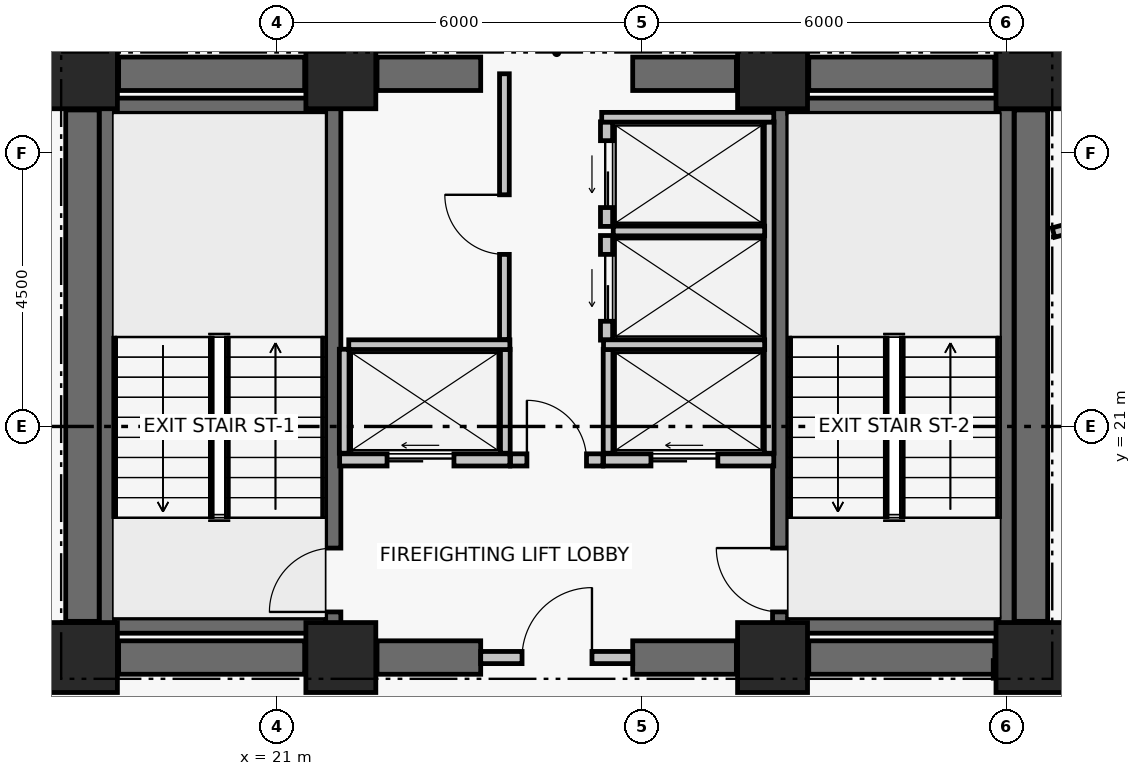
"""IFC4 building model, lengths in metres.
Left out: names, types, materials, properties, quantities, classifications, styles, units other than length and angle.
Written with IfcOpenShell. Run it as: python <this file> out.ifc"""

import sys

from ifc_helpers import new_model, si_unit, direction, frame, frame_2d, origin, origin_2d, place, context, subcontext, project, spatial, rectangle, extrude, element, fill, save


model = new_model("IFC4")
c1 = context("Model", 3, precision=1e-05, world=origin(), true_north=direction((0.0, 1.0)))
c2 = subcontext(c1, "Body", "Model", "MODEL_VIEW")
j1 = project(units=[si_unit("LENGTHUNIT", "METRE"), si_unit("PLANEANGLEUNIT", "RADIAN")], contexts=[c1])
p1 = place(None, origin())
s1 = spatial("IfcSite", under=j1, at=p1, CompositionType="ELEMENT")
p2 = place(p1, origin())
s2 = spatial("IfcBuilding", under=s1, at=p2, CompositionType="ELEMENT")
p3 = place(p2, frame((0.0, 0.0, 148.62)))
s3 = spatial("IfcBuildingStorey", under=s2, at=p3, CompositionType="ELEMENT", Elevation=148.62)
for number, where, z_axis, x_axis in (
    (1, (17.8, 17.2, 0.0), (0.0, 0.0, 1.0), (1.0, 0.0, 0.0)),
    (2, (22.05, 17.2, 0.0), (0.0, 0.0, 1.0), (1.0, 0.0, 0.0)),
    (3, (29.15, 17.2, 0.0), (0.0, 0.0, 1.0), (1.0, 0.0, 0.0)),
    (4, (33.4, 17.2, 0.0), (0.0, 0.0, 1.0), (1.0, 0.0, 0.0)),
    (5, (17.8, 26.8, 0.0), (0.0, 0.0, 1.0), (1.0, 0.0, 0.0)),
    (6, (22.05, 26.8, 0.0), (0.0, 0.0, 1.0), (1.0, 0.0, 0.0)),
    (7, (29.15, 26.8, 0.0), (0.0, 0.0, 1.0), (1.0, 0.0, 0.0)),
    (8, (33.4, 26.8, 0.0), (0.0, 0.0, 1.0), (1.0, 0.0, 0.0)),
):
    element("IfcColumn", number, at=place(p3, frame(where, z_axis=z_axis, x_axis=x_axis)), inside=s3, PredefinedType="COLUMN", context=c2, shape_type="SweptSolid", body=[
        extrude(rectangle(XDim=1.15, YDim=1.15, at=origin_2d()), origin(), (0.0, 0.0, 1.0), 5.7),
    ])
p4 = place(p3, frame((18.395, 17.2, 0.0), z_axis=(0.0, 0.0, 1.0), x_axis=(1.0, 0.0, 0.0)))
e9 = element("IfcWall", 9, at=p4, inside=s3, PredefinedType="SHEAR", context=c2, shape_type="SweptSolid", body=[
    extrude(rectangle(XDim=3.06, YDim=0.55, at=frame_2d((1.53, 0.0))), origin(), (0.0, 0.0, 1.0), 5.42),
])
p5 = place(p3, frame((22.645, 17.2, 0.0), z_axis=(0.0, 0.0, 1.0), x_axis=(1.0, 0.0, 0.0)))
e10 = element("IfcWall", 10, at=p5, inside=s3, PredefinedType="SHEAR", context=c2, shape_type="SweptSolid", body=[
    extrude(rectangle(XDim=1.705, YDim=0.55, at=frame_2d((0.853, 0.0))), origin(), (0.0, 0.0, 1.0), 5.42),
])
p6 = place(p3, frame((26.85, 17.2, 0.0), z_axis=(0.0, 0.0, 1.0), x_axis=(1.0, 0.0, 0.0)))
e11 = element("IfcWall", 11, at=p6, inside=s3, PredefinedType="SHEAR", context=c2, shape_type="SweptSolid", body=[
    extrude(rectangle(XDim=1.705, YDim=0.55, at=frame_2d((0.853, 0.0))), origin(), (0.0, 0.0, 1.0), 5.42),
])
p7 = place(p3, frame((29.745, 17.2, 0.0), z_axis=(0.0, 0.0, 1.0), x_axis=(1.0, 0.0, 0.0)))
e12 = element("IfcWall", 12, at=p7, inside=s3, PredefinedType="SHEAR", context=c2, shape_type="SweptSolid", body=[
    extrude(rectangle(XDim=3.06, YDim=0.55, at=frame_2d((1.53, 0.0))), origin(), (0.0, 0.0, 1.0), 5.42),
])
p8 = place(p3, frame((18.395, 26.8, 0.0), z_axis=(0.0, 0.0, 1.0), x_axis=(1.0, 0.0, 0.0)))
e13 = element("IfcWall", 13, at=p8, inside=s3, PredefinedType="SHEAR", context=c2, shape_type="SweptSolid", body=[
    extrude(rectangle(XDim=3.06, YDim=0.55, at=frame_2d((1.53, 0.0))), origin(), (0.0, 0.0, 1.0), 5.42),
])
p9 = place(p3, frame((22.645, 26.8, 0.0), z_axis=(0.0, 0.0, 1.0), x_axis=(1.0, 0.0, 0.0)))
e14 = element("IfcWall", 14, at=p9, inside=s3, PredefinedType="SHEAR", context=c2, shape_type="SweptSolid", body=[
    extrude(rectangle(XDim=1.705, YDim=0.55, at=frame_2d((0.853, 0.0))), origin(), (0.0, 0.0, 1.0), 5.42),
])
p10 = place(p3, frame((26.85, 26.8, 0.0), z_axis=(0.0, 0.0, 1.0), x_axis=(1.0, 0.0, 0.0)))
e15 = element("IfcWall", 15, at=p10, inside=s3, PredefinedType="SHEAR", context=c2, shape_type="SweptSolid", body=[
    extrude(rectangle(XDim=1.705, YDim=0.55, at=frame_2d((0.853, 0.0))), origin(), (0.0, 0.0, 1.0), 5.42),
])
p11 = place(p3, frame((29.745, 26.8, 0.0), z_axis=(0.0, 0.0, 1.0), x_axis=(1.0, 0.0, 0.0)))
e16 = element("IfcWall", 16, at=p11, inside=s3, PredefinedType="SHEAR", context=c2, shape_type="SweptSolid", body=[
    extrude(rectangle(XDim=3.06, YDim=0.55, at=frame_2d((1.53, 0.0))), origin(), (0.0, 0.0, 1.0), 5.42),
])
for number, where, z_axis, x_axis in (
    (17, (17.8, 17.795, 0.0), (0.0, 0.0, 1.0), (0.0, 1.0, 0.0)),
    (18, (33.4, 17.795, 0.0), (0.0, 0.0, 1.0), (0.0, 1.0, 0.0)),
):
    element("IfcWall", number, at=place(p3, frame(where, z_axis=z_axis, x_axis=x_axis)), inside=s3, PredefinedType="SHEAR", context=c2, shape_type="SweptSolid", body=[
        extrude(rectangle(XDim=8.41, YDim=0.55, at=frame_2d((4.205, 0.0))), origin(), (0.0, 0.0, 1.0), 5.42),
    ])
p12 = place(p3, frame((18.204, 17.6, 0.0), z_axis=(0.0, 0.0, 1.0), x_axis=(0.0, 1.0, 0.0)))
e19 = element("IfcWall", 19, at=p12, inside=s3, PredefinedType="SHEAR", context=c2, shape_type="SweptSolid", body=[
    extrude(rectangle(XDim=8.8, YDim=0.25, at=frame_2d((4.4, 0.0))), origin(), (0.0, 0.0, 1.0), 5.42),
])
p13 = place(p3, frame((21.925, 17.6, 0.0), z_axis=(0.0, 0.0, 1.0), x_axis=(0.0, 1.0, 0.0)))
e20 = element("IfcWall", 20, at=p13, inside=s3, PredefinedType="SHEAR", context=c2, shape_type="SweptSolid", body=[
    extrude(rectangle(XDim=8.8, YDim=0.25, at=frame_2d((4.4, 0.0))), origin(), (0.0, 0.0, 1.0), 5.42),
])
p14 = place(p13, frame((0.35, 0.0, 0.0)))
e21 = element("IfcOpeningElement", 21, at=p14, cuts=e20, PredefinedType="OPENING", context=c2, shape_type="SweptSolid", body=[
    extrude(rectangle(XDim=1.05, YDim=2.08, at=frame_2d((0.525, 1.04))), frame((0.0, 0.135, 0.0), z_axis=(0.0, -1.0, 0.0), x_axis=(1.0, 0.0, 0.0)), (0.0, 0.0, 1.0), 0.27),
])
for number, where, z_axis, x_axis in (
    (22, (18.329, 17.725, 0.0), (0.0, 0.0, 1.0), (1.0, 0.0, 0.0)),
    (23, (18.329, 26.275, 0.0), (0.0, 0.0, 1.0), (1.0, 0.0, 0.0)),
):
    element("IfcWall", number, at=place(p3, frame(where, z_axis=z_axis, x_axis=x_axis)), inside=s3, PredefinedType="SHEAR", context=c2, shape_type="SweptSolid", body=[
        extrude(rectangle(XDim=3.471, YDim=0.25, at=frame_2d((1.735, 0.0))), origin(), (0.0, 0.0, 1.0), 5.42),
    ])
p15 = place(p3, frame((29.275, 17.6, 0.0), z_axis=(0.0, 0.0, 1.0), x_axis=(0.0, 1.0, 0.0)))
e24 = element("IfcWall", 24, at=p15, inside=s3, PredefinedType="SHEAR", context=c2, shape_type="SweptSolid", body=[
    extrude(rectangle(XDim=8.8, YDim=0.25, at=frame_2d((4.4, 0.0))), origin(), (0.0, 0.0, 1.0), 5.42),
])
p16 = place(p15, frame((0.35, 0.0, 0.0)))
e25 = element("IfcOpeningElement", 25, at=p16, cuts=e24, PredefinedType="OPENING", context=c2, shape_type="SweptSolid", body=[
    extrude(rectangle(XDim=1.05, YDim=2.08, at=frame_2d((0.525, 1.04))), frame((0.0, 0.135, 0.0), z_axis=(0.0, -1.0, 0.0), x_axis=(1.0, 0.0, 0.0)), (0.0, 0.0, 1.0), 0.27),
])
p17 = place(p3, frame((32.996, 17.6, 0.0), z_axis=(0.0, 0.0, 1.0), x_axis=(0.0, 1.0, 0.0)))
e26 = element("IfcWall", 26, at=p17, inside=s3, PredefinedType="SHEAR", context=c2, shape_type="SweptSolid", body=[
    extrude(rectangle(XDim=8.8, YDim=0.25, at=frame_2d((4.4, 0.0))), origin(), (0.0, 0.0, 1.0), 5.42),
])
for number, where, z_axis, x_axis in (
    (27, (29.4, 17.725, 0.0), (0.0, 0.0, 1.0), (1.0, 0.0, 0.0)),
    (28, (29.4, 26.275, 0.0), (0.0, 0.0, 1.0), (1.0, 0.0, 0.0)),
):
    element("IfcWall", number, at=place(p3, frame(where, z_axis=z_axis, x_axis=x_axis)), inside=s3, PredefinedType="SHEAR", context=c2, shape_type="SweptSolid", body=[
        extrude(rectangle(XDim=3.471, YDim=0.25, at=frame_2d((1.736, 0.0))), origin(), (0.0, 0.0, 1.0), 5.42),
    ])
p18 = place(p3, frame((24.35, 17.2, 0.0), z_axis=(0.0, 0.0, 1.0), x_axis=(1.0, 0.0, 0.0)))
e29 = element("IfcWall", 29, at=p18, inside=s3, PredefinedType="PARTITIONING", context=c2, shape_type="SweptSolid", body=[
    extrude(rectangle(XDim=2.5, YDim=0.2, at=frame_2d((1.25, 0.0))), origin(), (0.0, 0.0, 1.0), 4.55),
])
p19 = place(p18, frame((0.68, 0.0, 0.0)))
e30 = element("IfcOpeningElement", 30, at=p19, cuts=e29, PredefinedType="OPENING", context=c2, shape_type="SweptSolid", body=[
    extrude(rectangle(XDim=1.15, YDim=2.08, at=frame_2d((0.575, 1.04))), frame((0.0, 0.11, 0.0), z_axis=(0.0, -1.0, 0.0), x_axis=(1.0, 0.0, 0.0)), (0.0, 0.0, 1.0), 0.22),
])
p20 = place(p3, frame((24.84, 20.45, 0.0), z_axis=(0.0, 0.0, 1.0), x_axis=(1.0, 0.0, 0.0)))
e31 = element("IfcWall", 31, at=p20, inside=s3, PredefinedType="PARTITIONING", context=c2, shape_type="SweptSolid", body=[
    extrude(rectangle(XDim=1.52, YDim=0.2, at=frame_2d((0.76, 0.0))), origin(), (0.0, 0.0, 1.0), 5.42),
])
p21 = place(p20, frame((0.27, 0.0, 0.0)))
e32 = element("IfcOpeningElement", 32, at=p21, cuts=e31, PredefinedType="OPENING", context=c2, shape_type="SweptSolid", body=[
    extrude(rectangle(XDim=0.98, YDim=2.06, at=frame_2d((0.49, 1.03))), frame((0.0, 0.11, 0.0), z_axis=(0.0, -1.0, 0.0), x_axis=(1.0, 0.0, 0.0)), (0.0, 0.0, 1.0), 0.22),
])
p22 = place(p3, frame((22.03, 20.45, 0.0), z_axis=(0.0, 0.0, 1.0), x_axis=(1.0, 0.0, 0.0)))
e33 = element("IfcWall", 33, at=p22, inside=s3, PredefinedType="PARTITIONING", context=c2, shape_type="SweptSolid", body=[
    extrude(rectangle(XDim=2.8, YDim=0.2, at=frame_2d((1.4, 0.0))), origin(), (0.0, 0.0, 1.0), 5.42),
])
p23 = place(p22, frame((0.78, 0.0, 0.0)))
e34 = element("IfcOpeningElement", 34, at=p23, cuts=e33, PredefinedType="OPENING", context=c2, shape_type="SweptSolid", body=[
    extrude(rectangle(XDim=1.1, YDim=2.08, at=frame_2d((0.55, 1.04))), frame((0.0, 0.11, 0.0), z_axis=(0.0, -1.0, 0.0), x_axis=(1.0, 0.0, 0.0)), (0.0, 0.0, 1.0), 0.22),
])
p24 = place(p3, frame((26.37, 20.45, 0.0), z_axis=(0.0, 0.0, 1.0), x_axis=(1.0, 0.0, 0.0)))
e35 = element("IfcWall", 35, at=p24, inside=s3, PredefinedType="PARTITIONING", context=c2, shape_type="SweptSolid", body=[
    extrude(rectangle(XDim=2.8, YDim=0.2, at=frame_2d((1.4, 0.0))), origin(), (0.0, 0.0, 1.0), 5.42),
])
p25 = place(p24, frame((0.78, 0.0, 0.0)))
e36 = element("IfcOpeningElement", 36, at=p25, cuts=e35, PredefinedType="OPENING", context=c2, shape_type="SweptSolid", body=[
    extrude(rectangle(XDim=1.1, YDim=2.08, at=frame_2d((0.55, 1.04))), frame((0.0, 0.11, 0.0), z_axis=(0.0, -1.0, 0.0), x_axis=(1.0, 0.0, 0.0)), (0.0, 0.0, 1.0), 0.22),
])
p26 = place(p3, frame((26.42, 22.42, 0.0), z_axis=(0.0, 0.0, 1.0), x_axis=(0.0, 1.0, 0.0)))
e37 = element("IfcWall", 37, at=p26, inside=s3, PredefinedType="PARTITIONING", context=c2, shape_type="SweptSolid", body=[
    extrude(rectangle(XDim=1.72, YDim=0.2, at=frame_2d((0.86, 0.0))), origin(), (0.0, 0.0, 1.0), 5.42),
])
p27 = place(p26, frame((0.31, 0.0, 0.0)))
e38 = element("IfcOpeningElement", 38, at=p27, cuts=e37, PredefinedType="OPENING", context=c2, shape_type="SweptSolid", body=[
    extrude(rectangle(XDim=1.1, YDim=2.08, at=frame_2d((0.55, 1.04))), frame((0.0, 0.11, 0.0), z_axis=(0.0, -1.0, 0.0), x_axis=(1.0, 0.0, 0.0)), (0.0, 0.0, 1.0), 0.22),
])
p28 = place(p3, frame((26.42, 24.29, 0.0), z_axis=(0.0, 0.0, 1.0), x_axis=(0.0, 1.0, 0.0)))
e39 = element("IfcWall", 39, at=p28, inside=s3, PredefinedType="PARTITIONING", context=c2, shape_type="SweptSolid", body=[
    extrude(rectangle(XDim=1.72, YDim=0.2, at=frame_2d((0.86, 0.0))), origin(), (0.0, 0.0, 1.0), 5.42),
])
p29 = place(p28, frame((0.31, 0.0, 0.0)))
e40 = element("IfcOpeningElement", 40, at=p29, cuts=e39, PredefinedType="OPENING", context=c2, shape_type="SweptSolid", body=[
    extrude(rectangle(XDim=1.1, YDim=2.08, at=frame_2d((0.55, 1.04))), frame((0.0, 0.11, 0.0), z_axis=(0.0, -1.0, 0.0), x_axis=(1.0, 0.0, 0.0)), (0.0, 0.0, 1.0), 0.22),
])
for number, where, z_axis, x_axis in (
    (41, (22.105, 20.56, 0.0), (0.0, 0.0, 1.0), (0.0, 1.0, 0.0)),
    (42, (24.755, 20.56, 0.0), (0.0, 0.0, 1.0), (0.0, 1.0, 0.0)),
):
    element("IfcWall", number, at=place(p3, frame(where, z_axis=z_axis, x_axis=x_axis)), inside=s3, PredefinedType="PARTITIONING", context=c2, shape_type="SweptSolid", body=[
        extrude(rectangle(XDim=1.71, YDim=0.16, at=frame_2d((0.855, 0.0))), origin(), (0.0, 0.0, 1.0), 5.42),
    ])
p30 = place(p3, frame((22.18, 22.345, 0.0), z_axis=(0.0, 0.0, 1.0), x_axis=(1.0, 0.0, 0.0)))
e43 = element("IfcWall", 43, at=p30, inside=s3, PredefinedType="PARTITIONING", context=c2, shape_type="SweptSolid", body=[
    extrude(rectangle(XDim=2.65, YDim=0.16, at=frame_2d((1.325, 0.0))), origin(), (0.0, 0.0, 1.0), 5.42),
])
p31 = place(p3, frame((29.095, 20.56, 0.0), z_axis=(0.0, 0.0, 1.0), x_axis=(0.0, 1.0, 0.0)))
e44 = element("IfcWall", 44, at=p31, inside=s3, PredefinedType="PARTITIONING", context=c2, shape_type="SweptSolid", body=[
    extrude(rectangle(XDim=5.45, YDim=0.16, at=frame_2d((2.725, 0.0))), origin(), (0.0, 0.0, 1.0), 5.42),
])
p32 = place(p3, frame((26.445, 20.56, 0.0), z_axis=(0.0, 0.0, 1.0), x_axis=(0.0, 1.0, 0.0)))
e45 = element("IfcWall", 45, at=p32, inside=s3, PredefinedType="PARTITIONING", context=c2, shape_type="SweptSolid", body=[
    extrude(rectangle(XDim=1.71, YDim=0.16, at=frame_2d((0.855, 0.0))), origin(), (0.0, 0.0, 1.0), 5.42),
])
p33 = place(p3, frame((26.37, 22.345, 0.0), z_axis=(0.0, 0.0, 1.0), x_axis=(1.0, 0.0, 0.0)))
e46 = element("IfcWall", 46, at=p33, inside=s3, PredefinedType="PARTITIONING", context=c2, shape_type="SweptSolid", body=[
    extrude(rectangle(XDim=2.65, YDim=0.16, at=frame_2d((1.325, 0.0))), origin(), (0.0, 0.0, 1.0), 5.42),
])
p34 = place(p3, frame((26.53, 24.215, 0.0), z_axis=(0.0, 0.0, 1.0), x_axis=(1.0, 0.0, 0.0)))
e47 = element("IfcWall", 47, at=p34, inside=s3, PredefinedType="PARTITIONING", context=c2, shape_type="SweptSolid", body=[
    extrude(rectangle(XDim=2.49, YDim=0.16, at=frame_2d((1.245, 0.0))), origin(), (0.0, 0.0, 1.0), 5.42),
])
p35 = place(p3, frame((26.34, 26.085, 0.0), z_axis=(0.0, 0.0, 1.0), x_axis=(1.0, 0.0, 0.0)))
e48 = element("IfcWall", 48, at=p35, inside=s3, PredefinedType="PARTITIONING", context=c2, shape_type="SweptSolid", body=[
    extrude(rectangle(XDim=2.83, YDim=0.16, at=frame_2d((1.415, 0.0))), origin(), (0.0, 0.0, 1.0), 5.42),
])
p36 = place(p3, frame((24.74, 22.43, 0.0), z_axis=(0.0, 0.0, 1.0), x_axis=(0.0, 1.0, 0.0)))
e49 = element("IfcWall", 49, at=p36, inside=s3, PredefinedType="PARTITIONING", context=c2, shape_type="SweptSolid", body=[
    extrude(rectangle(XDim=4.37, YDim=0.16, at=frame_2d((2.185, 0.0))), origin(), (0.0, 0.0, 1.0), 4.55),
])
p37 = place(p36, frame((1.4, 0.0, 0.0)))
e50 = element("IfcOpeningElement", 50, at=p37, cuts=e49, PredefinedType="OPENING", context=c2, shape_type="SweptSolid", body=[
    extrude(rectangle(XDim=0.98, YDim=2.06, at=frame_2d((0.49, 1.03))), frame((0.0, 0.09, 0.0), z_axis=(0.0, -1.0, 0.0), x_axis=(1.0, 0.0, 0.0)), (0.0, 0.0, 1.0), 0.18),
])
for number, where, z_axis, x_axis in (
    (51, (32.88, 16.78, 0.0), (0.0, 0.0, 1.0), (1.0, 0.0, 0.0)),
    (52, (33.74, 27.22, 0.0), (0.0, 0.0, 1.0), (-1.0, 0.0, 0.0)),
):
    element("IfcWall", number, at=place(p3, frame(where, z_axis=z_axis, x_axis=x_axis)), inside=s3, PredefinedType="PARTITIONING", context=c2, shape_type="SweptSolid", body=[
        extrude(rectangle(XDim=0.86, YDim=0.2, at=frame_2d((0.43, 0.0))), origin(), (0.0, 0.0, 1.0), 4.55),
    ])
p38 = place(p3, frame((33.77, 24.189, 0.0), z_axis=(0.0, 0.0, 1.0), x_axis=(0.96592502591, 0.258822032141, 0.0)))
e53 = element("IfcWall", 53, at=p38, inside=s3, PredefinedType="PARTITIONING", context=c2, shape_type="SweptSolid", body=[
    extrude(rectangle(XDim=4.875, YDim=0.16, at=frame_2d((2.438, 0.0))), origin(), (0.0, 0.0, 1.0), 4.55),
])
p39 = place(p3, frame((32.88, 16.86, 0.0), z_axis=(0.0, 0.0, 1.0), x_axis=(0.0, 1.0, 0.0)))
e54 = element("IfcWall", 54, at=p39, inside=s3, PredefinedType="PARTITIONING", context=c2, shape_type="SweptSolid", body=[
    extrude(rectangle(XDim=0.29, YDim=0.2, at=frame_2d((0.145, 0.0))), origin(), (0.0, 0.0, 1.0), 4.55),
])
p40 = place(p14, origin())
e55 = element("IfcDoor", 55, at=p40, inside=s3, OperationType="SINGLE_SWING_LEFT", PredefinedType="DOOR", context=c2, shape_type="SweptSolid", body=[
    extrude(rectangle(XDim=1.05, YDim=2.08, at=frame_2d((0.525, 1.04))), frame((0.0, 0.025, 0.0), z_axis=(0.0, -1.0, 0.0), x_axis=(1.0, 0.0, 0.0)), (0.0, 0.0, 1.0), 0.05),
])
fill(e21, e55)
p41 = place(p16, origin())
e56 = element("IfcDoor", 56, at=p41, inside=s3, OperationType="SINGLE_SWING_RIGHT", PredefinedType="DOOR", context=c2, shape_type="SweptSolid", body=[
    extrude(rectangle(XDim=1.05, YDim=2.08, at=frame_2d((0.525, 1.04))), frame((0.0, 0.025, 0.0), z_axis=(0.0, -1.0, 0.0), x_axis=(1.0, 0.0, 0.0)), (0.0, 0.0, 1.0), 0.05),
])
fill(e25, e56)
p42 = place(p19, origin())
e57 = element("IfcDoor", 57, at=p42, inside=s3, OperationType="SINGLE_SWING_RIGHT", PredefinedType="DOOR", context=c2, shape_type="SweptSolid", body=[
    extrude(rectangle(XDim=1.15, YDim=2.08, at=frame_2d((0.575, 1.04))), frame((0.0, 0.025, 0.0), z_axis=(0.0, -1.0, 0.0), x_axis=(1.0, 0.0, 0.0)), (0.0, 0.0, 1.0), 0.05),
])
fill(e30, e57)
p43 = place(p21, origin())
e58 = element("IfcDoor", 58, at=p43, inside=s3, OperationType="SINGLE_SWING_LEFT", PredefinedType="DOOR", context=c2, shape_type="SweptSolid", body=[
    extrude(rectangle(XDim=0.98, YDim=2.06, at=frame_2d((0.49, 1.03))), frame((0.0, 0.025, 0.0), z_axis=(0.0, -1.0, 0.0), x_axis=(1.0, 0.0, 0.0)), (0.0, 0.0, 1.0), 0.05),
])
fill(e32, e58)
p44 = place(p23, origin())
e59 = element("IfcDoor", 59, at=p44, inside=s3, OperationType="DOUBLE_DOOR_SLIDING", PredefinedType="DOOR", context=c2, shape_type="SweptSolid", body=[
    extrude(rectangle(XDim=1.1, YDim=2.08, at=frame_2d((0.55, 1.04))), frame((0.0, 0.025, 0.0), z_axis=(0.0, -1.0, 0.0), x_axis=(1.0, 0.0, 0.0)), (0.0, 0.0, 1.0), 0.05),
])
fill(e34, e59)
p45 = place(p25, origin())
e60 = element("IfcDoor", 60, at=p45, inside=s3, OperationType="DOUBLE_DOOR_SLIDING", PredefinedType="DOOR", context=c2, shape_type="SweptSolid", body=[
    extrude(rectangle(XDim=1.1, YDim=2.08, at=frame_2d((0.55, 1.04))), frame((0.0, 0.025, 0.0), z_axis=(0.0, -1.0, 0.0), x_axis=(1.0, 0.0, 0.0)), (0.0, 0.0, 1.0), 0.05),
])
fill(e36, e60)
p46 = place(p27, origin())
e61 = element("IfcDoor", 61, at=p46, inside=s3, OperationType="DOUBLE_DOOR_SLIDING", PredefinedType="DOOR", context=c2, shape_type="SweptSolid", body=[
    extrude(rectangle(XDim=1.1, YDim=2.08, at=frame_2d((0.55, 1.04))), frame((0.0, 0.025, 0.0), z_axis=(0.0, -1.0, 0.0), x_axis=(1.0, 0.0, 0.0)), (0.0, 0.0, 1.0), 0.05),
])
fill(e38, e61)
p47 = place(p29, origin())
e62 = element("IfcDoor", 62, at=p47, inside=s3, OperationType="DOUBLE_DOOR_SLIDING", PredefinedType="DOOR", context=c2, shape_type="SweptSolid", body=[
    extrude(rectangle(XDim=1.1, YDim=2.08, at=frame_2d((0.55, 1.04))), frame((0.0, 0.025, 0.0), z_axis=(0.0, -1.0, 0.0), x_axis=(1.0, 0.0, 0.0)), (0.0, 0.0, 1.0), 0.05),
])
fill(e40, e62)
p48 = place(p37, origin())
e63 = element("IfcDoor", 63, at=p48, inside=s3, OperationType="SINGLE_SWING_RIGHT", PredefinedType="DOOR", context=c2, shape_type="SweptSolid", body=[
    extrude(rectangle(XDim=0.98, YDim=2.06, at=frame_2d((0.49, 1.03))), frame((0.0, 0.025, 0.0), z_axis=(0.0, -1.0, 0.0), x_axis=(1.0, 0.0, 0.0)), (0.0, 0.0, 1.0), 0.05),
])
fill(e50, e63)
save(model, sys.argv[1])
